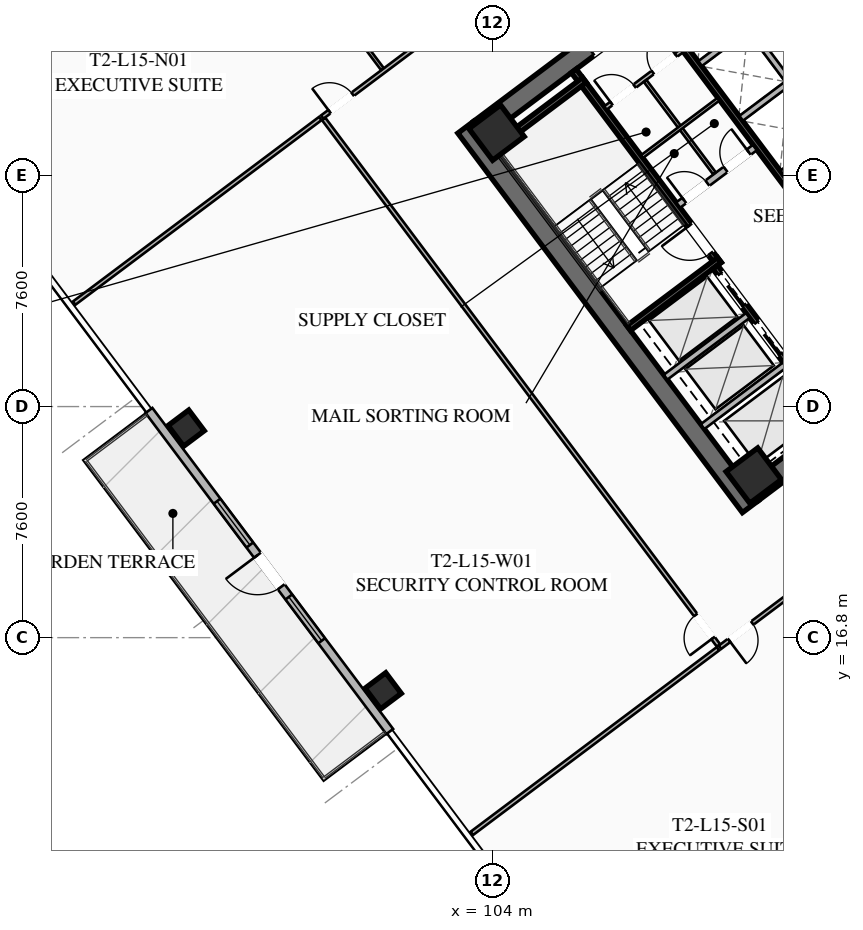
"""IFC4 building model, lengths in metres.
Left out: names, types, materials, properties, quantities, classifications, styles, units other than length and angle.
Written with IfcOpenShell. Run it as: python <this file> out.ifc"""

import sys

from ifc_helpers import new_model, si_unit, direction, frame, frame_2d, origin, origin_2d, place, context, subcontext, project, spatial, rectangle, hollow_rectangle, extrude, element, fill, save


model = new_model("IFC4")
c1 = context("Model", 3, precision=1e-05, world=origin(), true_north=direction((0.0, 1.0)))
c2 = subcontext(c1, "Body", "Model", "MODEL_VIEW")
j1 = project(units=[si_unit("LENGTHUNIT", "METRE"), si_unit("PLANEANGLEUNIT", "RADIAN")], contexts=[c1])
p1 = place(None, origin())
s1 = spatial("IfcSite", under=j1, at=p1, CompositionType="ELEMENT")
p2 = place(p1, origin())
s2 = spatial("IfcBuilding", under=s1, at=p2, CompositionType="ELEMENT")
p3 = place(p2, frame((0.0, 0.0, 60.1)))
s3 = spatial("IfcBuildingStorey", under=s2, at=p3, CompositionType="ELEMENT", Elevation=60.1)
p4 = place(p3, frame((112.476, 21.107, 0.0), z_axis=(0.0, 0.0, 1.0), x_axis=(-0.600005007985, 0.799996243986, 0.0)))
e1 = element("IfcWall", 1, at=p4, inside=s3, PredefinedType="SHEAR", context=c2, shape_type="SweptSolid", body=[
    extrude(rectangle(XDim=15.6, YDim=0.65, at=frame_2d((7.8, 0.0))), origin(), (0.0, 0.0, 1.0), 3.55),
])
p5 = place(p3, frame((124.429, 30.478, 0.0), z_axis=(0.0, 0.0, 1.0), x_axis=(-0.799998028465, -0.600002628705, 0.0)))
e2 = element("IfcWall", 2, at=p5, inside=s3, PredefinedType="SHEAR", context=c2, shape_type="SweptSolid", body=[
    extrude(rectangle(XDim=14.86, YDim=0.65, at=frame_2d((7.43, 0.0))), origin(), (0.0, 0.0, 1.0), 3.55),
])
p6 = place(p5, frame((9.13, 0.0, 0.0)))
e3 = element("IfcOpeningElement", 3, at=p6, cuts=e2, PredefinedType="OPENING", context=c2, shape_type="SweptSolid", body=[
    extrude(rectangle(XDim=1.25, YDim=2.25, at=frame_2d((0.625, 1.125))), frame((0.0, 0.335, 0.0), z_axis=(0.0, -1.0, 0.0), x_axis=(1.0, 0.0, 0.0)), (0.0, 0.0, 1.0), 0.67),
])
p7 = place(p5, frame((4.08, 0.0, 0.0)))
e4 = element("IfcOpeningElement", 4, at=p7, cuts=e2, PredefinedType="OPENING", context=c2, shape_type="SweptSolid", body=[
    extrude(rectangle(XDim=1.25, YDim=2.25, at=frame_2d((0.625, 1.125))), frame((0.0, 0.335, 0.0), z_axis=(0.0, -1.0, 0.0), x_axis=(1.0, 0.0, 0.0)), (0.0, 0.0, 1.0), 0.67),
])
p8 = place(p3, frame((103.571, 33.522, 0.0), z_axis=(0.0, 0.0, 1.0), x_axis=(0.799998028465, 0.600002628705, 0.0)))
e5 = element("IfcWall", 5, at=p8, inside=s3, PredefinedType="SHEAR", context=c2, shape_type="SweptSolid", body=[
    extrude(rectangle(XDim=14.86, YDim=0.65, at=frame_2d((7.43, 0.0))), origin(), (0.0, 0.0, 1.0), 3.55),
])
p9 = place(p8, frame((4.48, 0.0, 0.0)))
e6 = element("IfcOpeningElement", 6, at=p9, cuts=e5, PredefinedType="OPENING", context=c2, shape_type="SweptSolid", body=[
    extrude(rectangle(XDim=1.25, YDim=2.25, at=frame_2d((0.625, 1.125))), frame((0.0, 0.335, 0.0), z_axis=(0.0, -1.0, 0.0), x_axis=(1.0, 0.0, 0.0)), (0.0, 0.0, 1.0), 0.67),
])
p10 = place(p8, frame((9.53, 0.0, 0.0)))
e7 = element("IfcOpeningElement", 7, at=p10, cuts=e5, PredefinedType="OPENING", context=c2, shape_type="SweptSolid", body=[
    extrude(rectangle(XDim=1.25, YDim=2.25, at=frame_2d((0.625, 1.125))), frame((0.0, 0.335, 0.0), z_axis=(0.0, -1.0, 0.0), x_axis=(1.0, 0.0, 0.0)), (0.0, 0.0, 1.0), 0.67),
])
for number, where, z_axis, x_axis in (
    (8, (112.59, 22.13, 0.0), (0.0, 0.0, 1.0), (0.8, 0.6, 0.0)),
    (9, (104.13, 33.41, 0.0), (0.0, 0.0, 1.0), (0.8, 0.6, 0.0)),
):
    element("IfcColumn", number, at=place(p3, frame(where, z_axis=z_axis, x_axis=x_axis)), inside=s3, PredefinedType="COLUMN", context=c2, shape_type="SweptSolid", body=[
        extrude(hollow_rectangle(XDim=1.3, YDim=1.3, WallThickness=0.05, at=origin_2d()), origin(), (0.0, 0.0, 1.0), 3.35),
    ])
for number, where, z_axis, x_axis in (
    (10, (93.92, 23.69, 0.0), (0.0, 0.0, 1.0), (0.8, 0.6, 0.0)),
    (11, (100.4, 15.05, 0.0), (0.0, 0.0, 1.0), (0.8, 0.6, 0.0)),
):
    element("IfcColumn", number, at=place(p3, frame(where, z_axis=z_axis, x_axis=x_axis)), inside=s3, PredefinedType="COLUMN", context=c2, shape_type="SweptSolid", body=[
        extrude(hollow_rectangle(XDim=0.85, YDim=0.85, WallThickness=0.035, at=origin_2d()), origin(), (0.0, 0.0, 1.0), 3.35),
    ])
p11 = place(p3, frame((100.616, 13.712, 0.0), z_axis=(0.0, 0.0, 1.0), x_axis=(-0.599994081423, 0.800004438899, 0.0)))
e12 = element("IfcWall", 12, at=p11, inside=s3, PredefinedType="SOLIDWALL", context=c2, shape_type="SweptSolid", body=[
    extrude(rectangle(XDim=13.2, YDim=0.28, at=frame_2d((6.6, 0.0))), origin(), (0.0, 0.0, 1.0), 3.35),
])
p12 = place(p11, frame((5.95, 0.0, 0.0)))
e13 = element("IfcOpeningElement", 13, at=p12, cuts=e12, PredefinedType="OPENING", context=c2, shape_type="SweptSolid", body=[
    extrude(rectangle(XDim=1.3, YDim=2.15, at=frame_2d((0.65, 1.075))), frame((0.0, 0.15, 0.0), z_axis=(0.0, -1.0, 0.0), x_axis=(1.0, 0.0, 0.0)), (0.0, 0.0, 1.0), 0.3),
])
p13 = place(p11, frame((3.732, 0.0, 0.85)))
e14 = element("IfcOpeningElement", 14, at=p13, cuts=e12, PredefinedType="OPENING", context=c2, shape_type="SweptSolid", body=[
    extrude(rectangle(XDim=1.8, YDim=1.92, at=frame_2d((0.9, 0.96))), frame((0.0, 0.15, 0.0), z_axis=(0.0, -1.0, 0.0), x_axis=(1.0, 0.0, 0.0)), (0.0, 0.0, 1.0), 0.3),
])
p14 = place(p11, frame((7.668, 0.0, 0.85)))
e15 = element("IfcOpeningElement", 15, at=p14, cuts=e12, PredefinedType="OPENING", context=c2, shape_type="SweptSolid", body=[
    extrude(rectangle(XDim=1.8, YDim=1.92, at=frame_2d((0.9, 0.96))), frame((0.0, 0.15, 0.0), z_axis=(0.0, -1.0, 0.0), x_axis=(1.0, 0.0, 0.0)), (0.0, 0.0, 1.0), 0.3),
])
p15 = place(p3, frame((111.44, 29.08, 0.0), z_axis=(0.0, 0.0, 1.0), x_axis=(-0.600009827119, 0.799992629566, 0.0)))
e16 = element("IfcWall", 16, at=p15, inside=s3, PredefinedType="SHEAR", context=c2, shape_type="SweptSolid", body=[
    extrude(rectangle(XDim=7.95, YDim=0.2, at=frame_2d((3.975, 0.0))), origin(), (0.0, 0.0, 1.0), 3.35),
])
p16 = place(p15, frame((0.45, 0.0, 0.0)))
e17 = element("IfcOpeningElement", 17, at=p16, cuts=e16, PredefinedType="OPENING", context=c2, shape_type="SweptSolid", body=[
    extrude(rectangle(XDim=1.15, YDim=2.2, at=frame_2d((0.575, 1.1))), frame((0.0, 0.11, 0.0), z_axis=(0.0, -1.0, 0.0), x_axis=(1.0, 0.0, 0.0)), (0.0, 0.0, 1.0), 0.22),
])
for number, where, z_axis, x_axis in (
    (18, (108.476, 26.982, 0.0), (0.0, 0.0, 1.0), (0.8, 0.6, 0.0)),
    (19, (104.036, 32.902, 0.0), (0.0, 0.0, 1.0), (0.8, 0.6, 0.0)),
):
    element("IfcWall", number, at=place(p3, frame(where, z_axis=z_axis, x_axis=x_axis)), inside=s3, PredefinedType="SHEAR", context=c2, shape_type="SweptSolid", body=[
        extrude(rectangle(XDim=3.73, YDim=0.2, at=frame_2d((1.865, 0.0))), origin(), (0.0, 0.0, 1.0), 3.35),
    ])
p17 = place(p3, frame((117.938, 26.016, 0.0), z_axis=(0.0, 0.0, 1.0), x_axis=(-0.600005463273, 0.799995902516, 0.0)))
e20 = element("IfcWall", 20, at=p17, inside=s3, PredefinedType="SHEAR", context=c2, shape_type="SweptSolid", body=[
    extrude(rectangle(XDim=14.3, YDim=0.2, at=frame_2d((7.15, 0.0))), origin(), (0.0, 0.0, 1.0), 3.35),
])
p18 = place(p3, frame((110.104, 31.028, 0.0), z_axis=(0.0, 0.0, 1.0), x_axis=(0.800018601094, 0.59997519774, 0.0)))
e21 = element("IfcWall", 21, at=p18, inside=s3, PredefinedType="SOLIDWALL", context=c2, shape_type="SweptSolid", body=[
    extrude(rectangle(XDim=3.15, YDim=0.22, at=frame_2d((1.575, 0.0))), origin(), (0.0, 0.0, 1.0), 2.703),
])
p19 = place(p18, frame((0.25, 0.0, 0.0)))
e22 = element("IfcOpeningElement", 22, at=p19, cuts=e21, PredefinedType="OPENING", context=c2, shape_type="SweptSolid", body=[
    extrude(rectangle(XDim=0.95, YDim=2.05, at=frame_2d((0.475, 1.025))), frame((0.0, 0.12, 0.0), z_axis=(0.0, -1.0, 0.0), x_axis=(1.0, 0.0, 0.0)), (0.0, 0.0, 1.0), 0.24),
])
p20 = place(p18, frame((1.95, 0.0, 0.0)))
e23 = element("IfcOpeningElement", 23, at=p20, cuts=e21, PredefinedType="OPENING", context=c2, shape_type="SweptSolid", body=[
    extrude(rectangle(XDim=0.95, YDim=2.05, at=frame_2d((0.475, 1.025))), frame((0.0, 0.12, 0.0), z_axis=(0.0, -1.0, 0.0), x_axis=(1.0, 0.0, 0.0)), (0.0, 0.0, 1.0), 0.24),
])
p21 = place(p3, frame((115.13, 23.91, 0.0), z_axis=(0.0, 0.0, 1.0), x_axis=(-0.599975393228, 0.800018454488, 0.0)))
e24 = element("IfcWall", 24, at=p21, inside=s3, PredefinedType="SHEAR", context=c2, shape_type="SweptSolid", body=[
    extrude(rectangle(XDim=6.35, YDim=0.2, at=frame_2d((3.175, 0.0))), origin(), (0.0, 0.0, 1.0), 3.35),
])
p22 = place(p21, frame((4.775, 0.0, 0.0)))
e25 = element("IfcOpeningElement", 25, at=p22, cuts=e24, PredefinedType="OPENING", context=c2, shape_type="SweptSolid", body=[
    extrude(rectangle(XDim=1.3, YDim=2.25, at=frame_2d((0.65, 1.125))), frame((0.0, 0.11, 0.0), z_axis=(0.0, -1.0, 0.0), x_axis=(1.0, 0.0, 0.0)), (0.0, 0.0, 1.0), 0.22),
])
p23 = place(p21, frame((2.775, 0.0, 0.0)))
e26 = element("IfcOpeningElement", 26, at=p23, cuts=e24, PredefinedType="OPENING", context=c2, shape_type="SweptSolid", body=[
    extrude(rectangle(XDim=1.3, YDim=2.25, at=frame_2d((0.65, 1.125))), frame((0.0, 0.11, 0.0), z_axis=(0.0, -1.0, 0.0), x_axis=(1.0, 0.0, 0.0)), (0.0, 0.0, 1.0), 0.22),
])
p24 = place(p21, frame((0.575, 0.0, 0.0)))
e27 = element("IfcOpeningElement", 27, at=p24, cuts=e24, PredefinedType="OPENING", context=c2, shape_type="SweptSolid", body=[
    extrude(rectangle(XDim=1.3, YDim=2.25, at=frame_2d((0.65, 1.125))), frame((0.0, 0.11, 0.0), z_axis=(0.0, -1.0, 0.0), x_axis=(1.0, 0.0, 0.0)), (0.0, 0.0, 1.0), 0.22),
])
for number, where, z_axis, x_axis in (
    (28, (110.906, 23.742, 0.0), (0.0, 0.0, 1.0), (0.8, 0.6, 0.0)),
    (29, (109.688, 25.366, 0.0), (0.0, 0.0, 1.0), (0.8, 0.6, 0.0)),
):
    element("IfcWall", number, at=place(p3, frame(where, z_axis=z_axis, x_axis=x_axis)), inside=s3, PredefinedType="SOLIDWALL", context=c2, shape_type="SweptSolid", body=[
        extrude(rectangle(XDim=3.38, YDim=0.2, at=frame_2d((1.69, 0.0))), origin(), (0.0, 0.0, 1.0), 3.35),
    ])
p25 = place(p3, frame((112.87, 40.09, 0.0), z_axis=(0.0, 0.0, 1.0), x_axis=(0.599975393228, -0.800018454488, 0.0)))
e30 = element("IfcWall", 30, at=p25, inside=s3, PredefinedType="SHEAR", context=c2, shape_type="SweptSolid", body=[
    extrude(rectangle(XDim=6.35, YDim=0.2, at=frame_2d((3.175, 0.0))), origin(), (0.0, 0.0, 1.0), 3.35),
])
p26 = place(p3, frame((107.71, 34.22, 0.0), z_axis=(0.0, 0.0, 1.0), x_axis=(0.799981399002, 0.60002480053, 0.0)))
e31 = element("IfcWall", 31, at=p26, inside=s3, PredefinedType="PARTITIONING", context=c2, shape_type="SweptSolid", body=[
    extrude(rectangle(XDim=3.15, YDim=0.135, at=frame_2d((1.575, 0.0))), origin(), (0.0, 0.0, 1.0), 2.703),
])
p27 = place(p26, frame((0.25, 0.0, 0.0)))
e32 = element("IfcOpeningElement", 32, at=p27, cuts=e31, PredefinedType="OPENING", context=c2, shape_type="SweptSolid", body=[
    extrude(rectangle(XDim=0.95, YDim=2.05, at=frame_2d((0.475, 1.025))), frame((0.0, 0.077, 0.0), z_axis=(0.0, -1.0, 0.0), x_axis=(1.0, 0.0, 0.0)), (0.0, 0.0, 1.0), 0.155),
])
p28 = place(p26, frame((1.95, 0.0, 0.0)))
e33 = element("IfcOpeningElement", 33, at=p28, cuts=e31, PredefinedType="OPENING", context=c2, shape_type="SweptSolid", body=[
    extrude(rectangle(XDim=0.95, YDim=2.05, at=frame_2d((0.475, 1.025))), frame((0.0, 0.077, 0.0), z_axis=(0.0, -1.0, 0.0), x_axis=(1.0, 0.0, 0.0)), (0.0, 0.0, 1.0), 0.155),
])
p29 = place(p3, frame((111.296, 32.072, 0.0), z_axis=(0.0, 0.0, 1.0), x_axis=(-0.59995887973, 0.800030838552, 0.0)))
e34 = element("IfcWall", 34, at=p29, inside=s3, PredefinedType="PARTITIONING", context=c2, shape_type="SweptSolid", body=[
    extrude(rectangle(XDim=3.8, YDim=0.11, at=frame_2d((1.9, 0.0))), origin(), (0.0, 0.0, 1.0), 2.703),
])
p30 = place(p3, frame((108.91, 32.62, 0.0), z_axis=(0.0, 0.0, 1.0), x_axis=(0.800018601094, 0.59997519774, 0.0)))
e35 = element("IfcWall", 35, at=p30, inside=s3, PredefinedType="PARTITIONING", context=c2, shape_type="SweptSolid", body=[
    extrude(rectangle(XDim=3.15, YDim=0.11, at=frame_2d((1.575, 0.0))), origin(), (0.0, 0.0, 1.0), 2.703),
])
p31 = place(p3, frame((115.11, 33.27, 0.0), z_axis=(0.0, 0.0, 1.0), x_axis=(-0.600011488909, 0.79999138319, 0.0)))
e36 = element("IfcWall", 36, at=p31, inside=s3, PredefinedType="SOLIDWALL", context=c2, shape_type="SweptSolid", body=[
    extrude(rectangle(XDim=6.8, YDim=0.2, at=frame_2d((3.4, 0.0))), origin(), (0.0, 0.0, 1.0), 3.35),
])
p32 = place(p3, frame((113.526, 32.082, 0.0), z_axis=(0.0, 0.0, 1.0), x_axis=(0.800046745961, 0.599937666993, 0.0)))
e37 = element("IfcWall", 37, at=p32, inside=s3, PredefinedType="SOLIDWALL", context=c2, shape_type="SweptSolid", body=[
    extrude(rectangle(XDim=1.88, YDim=0.2, at=frame_2d((0.94, 0.0))), origin(), (0.0, 0.0, 1.0), 3.35),
])
p33 = place(p3, frame((112.176, 33.882, 0.0), z_axis=(0.0, 0.0, 1.0), x_axis=(0.8, 0.6, 0.0)))
e38 = element("IfcWall", 38, at=p33, inside=s3, PredefinedType="SOLIDWALL", context=c2, shape_type="SweptSolid", body=[
    extrude(rectangle(XDim=1.88, YDim=0.2, at=frame_2d((0.94, 0.0))), origin(), (0.0, 0.0, 1.0), 3.35),
])
p34 = place(p3, frame((110.826, 35.682, 0.0), z_axis=(0.0, 0.0, 1.0), x_axis=(0.799984418148, 0.600020775241, 0.0)))
e39 = element("IfcWall", 39, at=p34, inside=s3, PredefinedType="SOLIDWALL", context=c2, shape_type="SweptSolid", body=[
    extrude(rectangle(XDim=1.88, YDim=0.2, at=frame_2d((0.94, 0.0))), origin(), (0.0, 0.0, 1.0), 3.35),
])
p35 = place(p3, frame((98.396, 33.922, 0.0), z_axis=(0.0, 0.0, 1.0), x_axis=(0.800001954438, 0.599997394074, 0.0)))
e40 = element("IfcWall", 40, at=p35, inside=s3, PredefinedType="PARTITIONING", context=c2, shape_type="SweptSolid", body=[
    extrude(rectangle(XDim=29.98, YDim=0.135, at=frame_2d((14.99, 0.0))), origin(), (0.0, 0.0, 1.0), 2.703),
])
p36 = place(p35, frame((0.3, 0.0, 0.0)))
e41 = element("IfcOpeningElement", 41, at=p36, cuts=e40, PredefinedType="OPENING", context=c2, shape_type="SweptSolid", body=[
    extrude(rectangle(XDim=0.95, YDim=2.05, at=frame_2d((0.475, 1.025))), frame((0.0, 0.077, 0.0), z_axis=(0.0, -1.0, 0.0), x_axis=(1.0, 0.0, 0.0)), (0.0, 0.0, 1.0), 0.155),
])
p37 = place(p35, frame((11.143, 0.0, 0.0)))
e42 = element("IfcOpeningElement", 42, at=p37, cuts=e40, PredefinedType="OPENING", context=c2, shape_type="SweptSolid", body=[
    extrude(rectangle(XDim=0.95, YDim=2.05, at=frame_2d((0.475, 1.025))), frame((0.0, 0.077, 0.0), z_axis=(0.0, -1.0, 0.0), x_axis=(1.0, 0.0, 0.0)), (0.0, 0.0, 1.0), 0.155),
])
p38 = place(p35, frame((28.73, 0.0, 0.0)))
e43 = element("IfcOpeningElement", 43, at=p38, cuts=e40, PredefinedType="OPENING", context=c2, shape_type="SweptSolid", body=[
    extrude(rectangle(XDim=0.95, YDim=2.05, at=frame_2d((0.475, 1.025))), frame((0.0, 0.077, 0.0), z_axis=(0.0, -1.0, 0.0), x_axis=(1.0, 0.0, 0.0)), (0.0, 0.0, 1.0), 0.155),
])
p39 = place(p3, frame((100.372, 35.504, 0.0), z_axis=(0.0, 0.0, 1.0), x_axis=(-0.600007301277, 0.79999452399, 0.0)))
e44 = element("IfcWall", 44, at=p39, inside=s3, PredefinedType="PARTITIONING", context=c2, shape_type="SweptSolid", body=[
    extrude(rectangle(XDim=10.7, YDim=0.11, at=frame_2d((5.35, 0.0))), origin(), (0.0, 0.0, 1.0), 2.703),
])
p40 = place(p3, frame((135.46, 34.47, 0.0), z_axis=(0.0, 0.0, 1.0), x_axis=(-0.799998045563, -0.600002605907, 0.0)))
e45 = element("IfcWall", 45, at=p40, inside=s3, PredefinedType="PARTITIONING", context=c2, shape_type="SweptSolid", body=[
    extrude(rectangle(XDim=29.98, YDim=0.135, at=frame_2d((14.99, 0.0))), origin(), (0.0, 0.0, 1.0), 2.703),
])
p41 = place(p40, frame((28.65, 0.0, 0.0)))
e46 = element("IfcOpeningElement", 46, at=p41, cuts=e45, PredefinedType="OPENING", context=c2, shape_type="SweptSolid", body=[
    extrude(rectangle(XDim=0.95, YDim=2.05, at=frame_2d((0.475, 1.025))), frame((0.0, 0.077, 0.0), z_axis=(0.0, -1.0, 0.0), x_axis=(1.0, 0.0, 0.0)), (0.0, 0.0, 1.0), 0.155),
])
p42 = place(p40, frame((17.938, 0.0, 0.0)))
e47 = element("IfcOpeningElement", 47, at=p42, cuts=e45, PredefinedType="OPENING", context=c2, shape_type="SweptSolid", body=[
    extrude(rectangle(XDim=0.95, YDim=2.05, at=frame_2d((0.475, 1.025))), frame((0.0, 0.077, 0.0), z_axis=(0.0, -1.0, 0.0), x_axis=(1.0, 0.0, 0.0)), (0.0, 0.0, 1.0), 0.155),
])
p43 = place(p40, frame((0.38, 0.0, 0.0)))
e48 = element("IfcOpeningElement", 48, at=p43, cuts=e45, PredefinedType="OPENING", context=c2, shape_type="SweptSolid", body=[
    extrude(rectangle(XDim=0.95, YDim=2.05, at=frame_2d((0.475, 1.025))), frame((0.0, 0.077, 0.0), z_axis=(0.0, -1.0, 0.0), x_axis=(1.0, 0.0, 0.0)), (0.0, 0.0, 1.0), 0.155),
])
p44 = place(p3, frame((111.428, 16.546, 0.0), z_axis=(0.0, 0.0, 1.0), x_axis=(-0.599996389772, 0.800002707659, 0.0)))
e49 = element("IfcWall", 49, at=p44, inside=s3, PredefinedType="PARTITIONING", context=c2, shape_type="SweptSolid", body=[
    extrude(rectangle(XDim=21.64, YDim=0.135, at=frame_2d((10.82, 0.0))), origin(), (0.0, 0.0, 1.0), 2.703),
])
p45 = place(p44, frame((0.3, 0.0, 0.0)))
e50 = element("IfcOpeningElement", 50, at=p45, cuts=e49, PredefinedType="OPENING", context=c2, shape_type="SweptSolid", body=[
    extrude(rectangle(XDim=0.95, YDim=2.05, at=frame_2d((0.475, 1.025))), frame((0.0, 0.077, 0.0), z_axis=(0.0, -1.0, 0.0), x_axis=(1.0, 0.0, 0.0)), (0.0, 0.0, 1.0), 0.155),
])
p46 = place(p3, frame((98.332, 33.874, 0.0), z_axis=(0.0, 0.0, 1.0), x_axis=(-0.799997105034, -0.600003859935, 0.0)))
e51 = element("IfcWall", 51, at=p46, inside=s3, PredefinedType="PARTITIONING", context=c2, shape_type="SweptSolid", body=[
    extrude(rectangle(XDim=10.12, YDim=0.135, at=frame_2d((5.06, 0.0))), origin(), (0.0, 0.0, 1.0), 2.703),
])
p47 = place(p3, frame((103.316, 10.362, 0.0), z_axis=(0.0, 0.0, 1.0), x_axis=(0.800005789764, 0.599992280237, 0.0)))
e52 = element("IfcWall", 52, at=p47, inside=s3, PredefinedType="PARTITIONING", context=c2, shape_type="SweptSolid", body=[
    extrude(rectangle(XDim=10.12, YDim=0.135, at=frame_2d((5.06, 0.0))), origin(), (0.0, 0.0, 1.0), 2.703),
])
p48 = place(p12, origin())
e53 = element("IfcDoor", 53, at=p48, inside=s3, OperationType="SINGLE_SWING_RIGHT", PredefinedType="DOOR", context=c2, shape_type="SweptSolid", body=[
    extrude(rectangle(XDim=1.3, YDim=2.15, at=frame_2d((0.65, 1.075))), frame((0.0, 0.025, 0.0), z_axis=(0.0, -1.0, 0.0), x_axis=(1.0, 0.0, 0.0)), (0.0, 0.0, 1.0), 0.05),
])
fill(e13, e53)
p49 = place(p13, origin())
e54 = element("IfcWindow", 54, at=p49, inside=s3, PartitioningType="SINGLE_PANEL", PredefinedType="WINDOW", context=c2, shape_type="SweptSolid", body=[
    extrude(rectangle(XDim=1.8, YDim=1.92, at=frame_2d((0.9, 0.96))), frame((0.0, 0.03, 0.0), z_axis=(0.0, -1.0, 0.0), x_axis=(1.0, 0.0, 0.0)), (0.0, 0.0, 1.0), 0.06),
])
fill(e14, e54)
p50 = place(p14, origin())
e55 = element("IfcWindow", 55, at=p50, inside=s3, PartitioningType="SINGLE_PANEL", PredefinedType="WINDOW", context=c2, shape_type="SweptSolid", body=[
    extrude(rectangle(XDim=1.8, YDim=1.92, at=frame_2d((0.9, 0.96))), frame((0.0, 0.03, 0.0), z_axis=(0.0, -1.0, 0.0), x_axis=(1.0, 0.0, 0.0)), (0.0, 0.0, 1.0), 0.06),
])
fill(e15, e55)
p51 = place(p16, origin())
e56 = element("IfcDoor", 56, at=p51, inside=s3, OperationType="SINGLE_SWING_RIGHT", PredefinedType="DOOR", context=c2, shape_type="SweptSolid", body=[
    extrude(rectangle(XDim=1.15, YDim=2.2, at=frame_2d((0.575, 1.1))), frame((0.0, 0.025, 0.0), z_axis=(0.0, -1.0, 0.0), x_axis=(1.0, 0.0, 0.0)), (0.0, 0.0, 1.0), 0.05),
])
fill(e17, e56)
p52 = place(p27, origin())
e57 = element("IfcDoor", 57, at=p52, inside=s3, OperationType="SINGLE_SWING_LEFT", PredefinedType="DOOR", context=c2, shape_type="SweptSolid", body=[
    extrude(rectangle(XDim=0.95, YDim=2.05, at=frame_2d((0.475, 1.025))), frame((0.0, 0.025, 0.0), z_axis=(0.0, -1.0, 0.0), x_axis=(1.0, 0.0, 0.0)), (0.0, 0.0, 1.0), 0.05),
])
fill(e32, e57)
p53 = place(p28, origin())
e58 = element("IfcDoor", 58, at=p53, inside=s3, OperationType="SINGLE_SWING_RIGHT", PredefinedType="DOOR", context=c2, shape_type="SweptSolid", body=[
    extrude(rectangle(XDim=0.95, YDim=2.05, at=frame_2d((0.475, 1.025))), frame((0.0, 0.025, 0.0), z_axis=(0.0, -1.0, 0.0), x_axis=(1.0, 0.0, 0.0)), (0.0, 0.0, 1.0), 0.05),
])
fill(e33, e58)
p54 = place(p19, origin())
e59 = element("IfcDoor", 59, at=p54, inside=s3, OperationType="SINGLE_SWING_LEFT", PredefinedType="DOOR", context=c2, shape_type="SweptSolid", body=[
    extrude(rectangle(XDim=0.95, YDim=2.05, at=frame_2d((0.475, 1.025))), frame((0.0, 0.025, 0.0), z_axis=(0.0, -1.0, 0.0), x_axis=(1.0, 0.0, 0.0)), (0.0, 0.0, 1.0), 0.05),
])
fill(e22, e59)
p55 = place(p20, origin())
e60 = element("IfcDoor", 60, at=p55, inside=s3, OperationType="SINGLE_SWING_RIGHT", PredefinedType="DOOR", context=c2, shape_type="SweptSolid", body=[
    extrude(rectangle(XDim=0.95, YDim=2.05, at=frame_2d((0.475, 1.025))), frame((0.0, 0.025, 0.0), z_axis=(0.0, -1.0, 0.0), x_axis=(1.0, 0.0, 0.0)), (0.0, 0.0, 1.0), 0.05),
])
fill(e23, e60)
p56 = place(p36, origin())
e61 = element("IfcDoor", 61, at=p56, inside=s3, OperationType="SINGLE_SWING_LEFT", PredefinedType="DOOR", context=c2, shape_type="SweptSolid", body=[
    extrude(rectangle(XDim=0.95, YDim=2.05, at=frame_2d((0.475, 1.025))), frame((0.0, 0.025, 0.0), z_axis=(0.0, -1.0, 0.0), x_axis=(1.0, 0.0, 0.0)), (0.0, 0.0, 1.0), 0.05),
])
fill(e41, e61)
p57 = place(p41, origin())
e62 = element("IfcDoor", 62, at=p57, inside=s3, OperationType="SINGLE_SWING_RIGHT", PredefinedType="DOOR", context=c2, shape_type="SweptSolid", body=[
    extrude(rectangle(XDim=0.95, YDim=2.05, at=frame_2d((0.475, 1.025))), frame((0.0, 0.025, 0.0), z_axis=(0.0, -1.0, 0.0), x_axis=(1.0, 0.0, 0.0)), (0.0, 0.0, 1.0), 0.05),
])
fill(e46, e62)
p58 = place(p45, origin())
e63 = element("IfcDoor", 63, at=p58, inside=s3, OperationType="SINGLE_SWING_LEFT", PredefinedType="DOOR", context=c2, shape_type="SweptSolid", body=[
    extrude(rectangle(XDim=0.95, YDim=2.05, at=frame_2d((0.475, 1.025))), frame((0.0, 0.025, 0.0), z_axis=(0.0, -1.0, 0.0), x_axis=(1.0, 0.0, 0.0)), (0.0, 0.0, 1.0), 0.05),
])
fill(e50, e63)
p59 = place(p22, origin())
e64 = element("IfcDoor", 64, at=p59, inside=s3, OperationType="SLIDING_TO_LEFT", PredefinedType="DOOR", context=c2, shape_type="SweptSolid", body=[
    extrude(rectangle(XDim=1.3, YDim=2.25, at=frame_2d((0.65, 1.125))), frame((0.0, 0.025, 0.0), z_axis=(0.0, -1.0, 0.0), x_axis=(1.0, 0.0, 0.0)), (0.0, 0.0, 1.0), 0.05),
])
fill(e25, e64)
p60 = place(p23, origin())
e65 = element("IfcDoor", 65, at=p60, inside=s3, OperationType="SLIDING_TO_LEFT", PredefinedType="DOOR", context=c2, shape_type="SweptSolid", body=[
    extrude(rectangle(XDim=1.3, YDim=2.25, at=frame_2d((0.65, 1.125))), frame((0.0, 0.025, 0.0), z_axis=(0.0, -1.0, 0.0), x_axis=(1.0, 0.0, 0.0)), (0.0, 0.0, 1.0), 0.05),
])
fill(e26, e65)
save(model, sys.argv[1])
